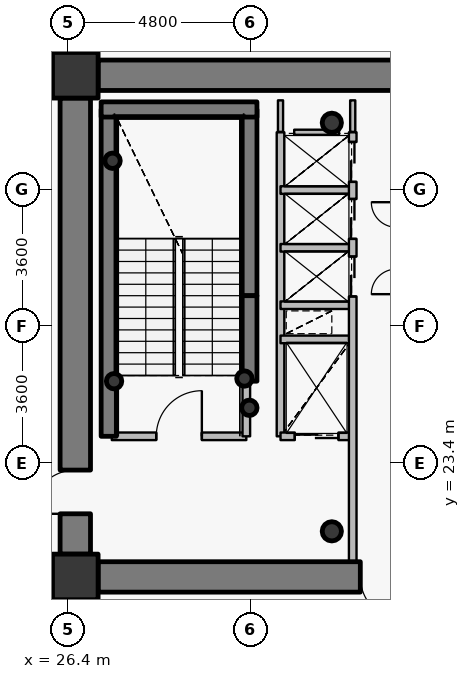
"""IFC4 building model, lengths in metres.
Left out: names, types, materials, properties, quantities, classifications, styles, units other than length and angle.
Written with IfcOpenShell. Run it as: python <this file> out.ifc"""

import sys

from ifc_helpers import new_model, si_unit, direction, frame, frame_2d, origin, origin_2d, place, context, subcontext, project, spatial, rectangle, hollow_circle, extrude, source, transform, mapped, element, fill, save


model = new_model("IFC4")
c1 = context("Model", 3, precision=1e-05, world=origin(), true_north=direction((0.0, 1.0)))
c2 = subcontext(c1, "Body", "Model", "MODEL_VIEW")
j1 = project(units=[si_unit("LENGTHUNIT", "METRE"), si_unit("PLANEANGLEUNIT", "RADIAN")], contexts=[c1])
p1 = place(None, origin())
s1 = spatial("IfcSite", under=j1, at=p1, CompositionType="ELEMENT")
p2 = place(p1, origin())
s2 = spatial("IfcBuilding", under=s1, at=p2, CompositionType="ELEMENT")
p3 = place(p2, frame((0.0, 0.0, 159.9)))
s3 = spatial("IfcBuildingStorey", under=s2, at=p3, CompositionType="ELEMENT", Elevation=159.9)
for number, where, z_axis, x_axis in (
    (1, (26.6, 20.4, 0.0), (0.0, 0.0, 1.0), (1.0, 0.0, 0.0)),
    (2, (26.6, 33.6, 0.0), (0.0, 0.0, 1.0), (1.0, 0.0, 0.0)),
):
    element("IfcColumn", number, at=place(p3, frame(where, z_axis=z_axis, x_axis=x_axis)), inside=s3, PredefinedType="COLUMN", context=c2, shape_type="SweptSolid", body=[
        extrude(rectangle(XDim=1.2, YDim=1.2, at=origin_2d()), origin(), (0.0, 0.0, 1.0), 3.75),
    ])
for number, where, z_axis, x_axis in (
    (3, (33.35, 21.6, 0.0), (0.0, 0.0, 1.0), (1.0, 0.0, 0.0)),
    (4, (33.35, 32.35, 0.0), (0.0, 0.0, 1.0), (1.0, 0.0, 0.0)),
):
    element("IfcColumn", number, at=place(p3, frame(where, z_axis=z_axis, x_axis=x_axis)), inside=s3, PredefinedType="COLUMN", context=c2, shape_type="SweptSolid", body=[
        extrude(hollow_circle(Radius=0.254, WallThickness=0.02, at=origin_2d()), origin(), (0.0, 0.0, 1.0), 3.75),
    ])
p4 = place(p3, frame((27.48, 24.1, 0.0), z_axis=(0.0, 0.0, 1.0), x_axis=(0.0, 1.0, 0.0)))
e5 = element("IfcWall", 5, at=p4, inside=s3, PredefinedType="SHEAR", context=c2, shape_type="SweptSolid", body=[
    extrude(rectangle(XDim=8.6, YDim=0.4, at=frame_2d((4.3, 0.0))), origin(), (0.0, 0.0, 1.0), 3.75),
])
p5 = place(p3, frame((31.18, 27.8, 0.0), z_axis=(0.0, 0.0, 1.0), x_axis=(0.0, 1.0, 0.0)))
e6 = element("IfcWall", 6, at=p5, inside=s3, PredefinedType="SHEAR", context=c2, shape_type="SweptSolid", body=[
    extrude(rectangle(XDim=4.9, YDim=0.4, at=frame_2d((2.45, 0.0))), origin(), (0.0, 0.0, 1.0), 3.75),
])
p6 = place(p3, frame((27.28, 32.7, 0.0), z_axis=(0.0, 0.0, 1.0), x_axis=(1.0, 0.0, 0.0)))
e7 = element("IfcWall", 7, at=p6, inside=s3, PredefinedType="SHEAR", context=c2, shape_type="SweptSolid", body=[
    extrude(rectangle(XDim=4.1, YDim=0.4, at=frame_2d((2.05, 0.0))), origin(), (0.0, 0.0, 1.0), 3.75),
])
for number, where, z_axis, x_axis in (
    (8, (27.58, 31.35, 0.0), (0.0, 0.0, 1.0), (1.0, 0.0, 0.0)),
    (9, (31.05, 25.62, 0.0), (0.0, 0.0, 1.0), (1.0, 0.0, 0.0)),
    (10, (31.18, 24.85, 0.0), (0.0, 0.0, 1.0), (1.0, 0.0, 0.0)),
    (11, (27.62, 25.55, 0.0), (0.0, 0.0, 1.0), (1.0, 0.0, 0.0)),
):
    element("IfcColumn", number, at=place(p3, frame(where, z_axis=z_axis, x_axis=x_axis)), inside=s3, PredefinedType="COLUMN", context=c2, shape_type="SweptSolid", body=[
        extrude(hollow_circle(Radius=0.203, WallThickness=0.016, at=origin_2d()), origin(), (0.0, 0.0, 1.0), 3.75),
    ])
p7 = place(p3, frame((27.2, 33.6, 0.0), z_axis=(0.0, 0.0, 1.0), x_axis=(1.0, 0.0, 0.0)))
e12 = element("IfcWall", 12, at=p7, inside=s3, PredefinedType="SHEAR", context=c2, shape_type="SweptSolid", body=[
    extrude(rectangle(XDim=17.6, YDim=0.8, at=frame_2d((8.8, 0.0))), origin(), (0.0, 0.0, 1.0), 2.95),
])
p8 = place(p7, frame((13.45, 0.0, 0.0)))
e13 = element("IfcOpeningElement", 13, at=p8, cuts=e12, PredefinedType="OPENING", context=c2, shape_type="SweptSolid", body=[
    extrude(rectangle(XDim=1.15, YDim=2.15, at=origin_2d()), frame((0.575, 0.41, 1.075), z_axis=(0.0, -1.0, 0.0), x_axis=(1.0, 0.0, 0.0)), (0.0, 0.0, 1.0), 0.82),
])
p9 = place(p3, frame((44.8, 20.4, 0.0), z_axis=(0.0, 0.0, 1.0), x_axis=(-1.0, 0.0, 0.0)))
e14 = element("IfcWall", 14, at=p9, inside=s3, PredefinedType="SHEAR", context=c2, shape_type="SweptSolid", body=[
    extrude(rectangle(XDim=17.6, YDim=0.8, at=frame_2d((8.8, 0.0))), origin(), (0.0, 0.0, 1.0), 2.95),
])
p10 = place(p9, frame((9.55, 0.0, 0.0)))
e15 = element("IfcOpeningElement", 15, at=p10, cuts=e14, PredefinedType="OPENING", context=c2, shape_type="SweptSolid", body=[
    extrude(rectangle(XDim=1.15, YDim=2.15, at=origin_2d()), frame((0.575, 0.41, 1.075), z_axis=(0.0, -1.0, 0.0), x_axis=(1.0, 0.0, 0.0)), (0.0, 0.0, 1.0), 0.82),
])
p11 = place(p3, frame((26.6, 21.0, 0.0), z_axis=(0.0, 0.0, 1.0), x_axis=(0.0, 1.0, 0.0)))
e16 = element("IfcWall", 16, at=p11, inside=s3, PredefinedType="SHEAR", context=c2, shape_type="SweptSolid", body=[
    extrude(rectangle(XDim=12.0, YDim=0.8, at=frame_2d((6.0, 0.0))), origin(), (0.0, 0.0, 1.0), 2.95),
])
p12 = place(p11, frame((1.061, 0.0, 0.0)))
e17 = element("IfcOpeningElement", 17, at=p12, cuts=e16, PredefinedType="OPENING", context=c2, shape_type="SweptSolid", body=[
    extrude(rectangle(XDim=1.15, YDim=2.15, at=origin_2d()), frame((0.575, 0.41, 1.075), z_axis=(0.0, -1.0, 0.0), x_axis=(1.0, 0.0, 0.0)), (0.0, 0.0, 1.0), 0.82),
])
p13 = place(p3, frame((31.18, 25.55, 0.0), z_axis=(0.0, 0.0, 1.0), x_axis=(0.0, 1.0, 0.0)))
e18 = element("IfcWall", 18, at=p13, inside=s3, PredefinedType="SHEAR", context=c2, shape_type="SweptSolid", body=[
    extrude(rectangle(XDim=2.25, YDim=0.4, at=frame_2d((1.125, 0.0))), origin(), (0.0, 0.0, 1.0), 3.1),
])
p14 = place(p3, frame((27.56, 24.1, 0.0), z_axis=(0.0, 0.0, 1.0), x_axis=(1.0, 0.0, 0.0)))
e19 = element("IfcWall", 19, at=p14, inside=s3, PredefinedType="PARTITIONING", context=c2, shape_type="SweptSolid", body=[
    extrude(rectangle(XDim=3.54, YDim=0.2, at=frame_2d((1.77, 0.0))), origin(), (0.0, 0.0, 1.0), 3.5),
])
p15 = place(p14, frame((1.17, 0.0, 0.0)))
e20 = element("IfcOpeningElement", 20, at=p15, cuts=e19, PredefinedType="OPENING", context=c2, shape_type="SweptSolid", body=[
    extrude(rectangle(XDim=1.2, YDim=2.15, at=origin_2d()), frame((0.6, 0.11, 1.075), z_axis=(0.0, -1.0, 0.0), x_axis=(1.0, 0.0, 0.0)), (0.0, 0.0, 1.0), 0.22),
])
p16 = place(p3, frame((31.1, 24.1, 0.0), z_axis=(0.0, 0.0, 1.0), x_axis=(0.0, 1.0, 0.0)))
e21 = element("IfcWall", 21, at=p16, inside=s3, PredefinedType="PARTITIONING", context=c2, shape_type="SweptSolid", body=[
    extrude(rectangle(XDim=1.44, YDim=0.2, at=frame_2d((0.72, 0.0))), origin(), (0.0, 0.0, 1.0), 3.5),
])
p17 = place(p3, frame((32.0, 24.1, 0.0), z_axis=(0.0, 0.0, 1.0), x_axis=(0.0, 1.0, 0.0)))
e22 = element("IfcWall", 22, at=p17, inside=s3, PredefinedType="PARTITIONING", context=c2, shape_type="SweptSolid", body=[
    extrude(rectangle(XDim=8.0, YDim=0.2, at=frame_2d((4.0, 0.0))), origin(), (0.0, 0.0, 1.0), 3.5),
])
p18 = place(p3, frame((32.0, 24.1, 0.0), z_axis=(0.0, 0.0, 1.0), x_axis=(1.0, 0.0, 0.0)))
e23 = element("IfcWall", 23, at=p18, inside=s3, PredefinedType="PARTITIONING", context=c2, shape_type="SweptSolid", body=[
    extrude(rectangle(XDim=1.9, YDim=0.2, at=frame_2d((0.95, 0.0))), origin(), (0.0, 0.0, 1.0), 3.085),
])
p19 = place(p18, frame((0.375, 0.0, 0.0)))
e24 = element("IfcOpeningElement", 24, at=p19, cuts=e23, PredefinedType="OPENING", context=c2, shape_type="SweptSolid", body=[
    extrude(rectangle(XDim=1.15, YDim=2.15, at=origin_2d()), frame((0.575, 0.11, 1.075), z_axis=(0.0, -1.0, 0.0), x_axis=(1.0, 0.0, 0.0)), (0.0, 0.0, 1.0), 0.22),
])
for number, where, z_axis, x_axis in (
    (25, (32.0, 26.65, 0.0), (0.0, 0.0, 1.0), (1.0, 0.0, 0.0)),
    (26, (32.0, 27.55, 0.0), (0.0, 0.0, 1.0), (1.0, 0.0, 0.0)),
    (27, (32.0, 29.06, 0.0), (0.0, 0.0, 1.0), (1.0, 0.0, 0.0)),
    (28, (32.0, 30.58, 0.0), (0.0, 0.0, 1.0), (1.0, 0.0, 0.0)),
):
    element("IfcWall", number, at=place(p3, frame(where, z_axis=z_axis, x_axis=x_axis)), inside=s3, PredefinedType="PARTITIONING", context=c2, shape_type="SweptSolid", body=[
        extrude(rectangle(XDim=1.9, YDim=0.2, at=frame_2d((0.95, 0.0))), origin(), (0.0, 0.0, 1.0), 3.085),
    ])
p20 = place(p3, frame((33.9, 20.8, 0.0), z_axis=(0.0, 0.0, 1.0), x_axis=(0.0, 1.0, 0.0)))
e29 = element("IfcWall", 29, at=p20, inside=s3, PredefinedType="PARTITIONING", context=c2, shape_type="SweptSolid", body=[
    extrude(rectangle(XDim=11.3, YDim=0.2, at=frame_2d((5.65, 0.0))), origin(), (0.0, 0.0, 1.0), 3.085),
])
p21 = place(p20, frame((6.98, 0.0, 0.0)))
e30 = element("IfcOpeningElement", 30, at=p21, cuts=e29, PredefinedType="OPENING", context=c2, shape_type="SweptSolid", body=[
    extrude(rectangle(XDim=1.05, YDim=2.15, at=origin_2d()), frame((0.525, 0.11, 1.075), z_axis=(0.0, -1.0, 0.0), x_axis=(1.0, 0.0, 0.0)), (0.0, 0.0, 1.0), 0.22),
])
p22 = place(p20, frame((8.495, 0.0, 0.0)))
e31 = element("IfcOpeningElement", 31, at=p22, cuts=e29, PredefinedType="OPENING", context=c2, shape_type="SweptSolid", body=[
    extrude(rectangle(XDim=1.05, YDim=2.15, at=origin_2d()), frame((0.525, 0.11, 1.075), z_axis=(0.0, -1.0, 0.0), x_axis=(1.0, 0.0, 0.0)), (0.0, 0.0, 1.0), 0.22),
])
p23 = place(p20, frame((9.995, 0.0, 0.0)))
e32 = element("IfcOpeningElement", 32, at=p23, cuts=e29, PredefinedType="OPENING", context=c2, shape_type="SweptSolid", body=[
    extrude(rectangle(XDim=1.05, YDim=2.15, at=origin_2d()), frame((0.525, 0.11, 1.075), z_axis=(0.0, -1.0, 0.0), x_axis=(1.0, 0.0, 0.0)), (0.0, 0.0, 1.0), 0.22),
])
p24 = place(p3, frame((32.36, 32.1, 0.0), z_axis=(0.0, 0.0, 1.0), x_axis=(1.0, 0.0, 0.0)))
e33 = element("IfcWall", 33, at=p24, inside=s3, PredefinedType="PARTITIONING", context=c2, shape_type="SweptSolid", body=[
    extrude(rectangle(XDim=1.18, YDim=0.135, at=frame_2d((0.59, 0.0))), origin(), (0.0, 0.0, 1.0), 3.085),
])
p25 = place(p3, frame((32.0, 32.94, 0.0), z_axis=(0.0, 0.0, 1.0), x_axis=(0.0, -1.0, 0.0)))
e34 = element("IfcWall", 34, at=p25, inside=s3, PredefinedType="PARTITIONING", context=c2, shape_type="SweptSolid", body=[
    extrude(rectangle(XDim=0.83, YDim=0.135, at=frame_2d((0.415, 0.0))), origin(), (0.0, 0.0, 1.0), 3.035),
])
p26 = place(p3, frame((33.9, 32.11, 0.0), z_axis=(0.0, 0.0, 1.0), x_axis=(0.0, 1.0, 0.0)))
e35 = element("IfcWall", 35, at=p26, inside=s3, PredefinedType="PARTITIONING", context=c2, shape_type="SweptSolid", body=[
    extrude(rectangle(XDim=0.83, YDim=0.135, at=frame_2d((0.415, 0.0))), origin(), (0.0, 0.0, 1.0), 3.085),
])
p27 = place(p3, frame((27.19, 34.0, 0.0), z_axis=(0.0, 0.0, 1.0), x_axis=(-1.0, 0.0, 0.0)))
e36 = element("IfcWall", 36, at=p27, inside=s3, PredefinedType="PARTITIONING", context=c2, shape_type="SweptSolid", body=[
    extrude(rectangle(XDim=0.99, YDim=0.135, at=frame_2d((0.495, 0.0))), origin(), (0.0, 0.0, 1.0), 2.935),
])
p28 = place(p3, frame((26.2, 33.692, 0.0), z_axis=(0.0, 0.0, 1.0), x_axis=(0.0, -1.0, 0.0)))
e37 = element("IfcWall", 37, at=p28, inside=s3, PredefinedType="PARTITIONING", context=c2, shape_type="SweptSolid", body=[
    extrude(rectangle(XDim=0.682, YDim=0.135, at=frame_2d((0.341, 0.0))), origin(), (0.0, 0.0, 1.0), 3.5),
])
p29 = place(p3, frame((26.2, 20.99, 0.0), z_axis=(0.0, 0.0, 1.0), x_axis=(0.0, -1.0, 0.0)))
e38 = element("IfcWall", 38, at=p29, inside=s3, PredefinedType="PARTITIONING", context=c2, shape_type="SweptSolid", body=[
    extrude(rectangle(XDim=0.99, YDim=0.135, at=frame_2d((0.495, 0.0))), origin(), (0.0, 0.0, 1.0), 3.5),
])
p30 = place(p3, frame((26.508, 20.0, 0.0), z_axis=(0.0, 0.0, 1.0), x_axis=(1.0, 0.0, 0.0)))
e39 = element("IfcWall", 39, at=p30, inside=s3, PredefinedType="PARTITIONING", context=c2, shape_type="SweptSolid", body=[
    extrude(rectangle(XDim=0.682, YDim=0.135, at=frame_2d((0.341, 0.0))), origin(), (0.0, 0.0, 1.0), 2.935),
])
m1 = source(origin(), c2, "Body", "SweptSolid", [
    extrude(rectangle(XDim=1.15, YDim=2.15, at=origin_2d()), frame((0.575, 0.025, 1.075), z_axis=(0.0, -1.0, 0.0), x_axis=(1.0, 0.0, 0.0)), (0.0, 0.0, 1.0), 0.05),
])
p31 = place(p12, origin())
e40 = element("IfcDoor", 40, at=p31, inside=s3, OperationType="SINGLE_SWING_LEFT", PredefinedType="DOOR", context=c2, shape_type="MappedRepresentation", body=[
    mapped(m1, transform((0.0, 0.0, 0.0), x_axis=(1.0, 0.0, 0.0), y_axis=(0.0, 1.0, 0.0), z_axis=(0.0, 0.0, 1.0), scale=1.0)),
])
fill(e17, e40)
p32 = place(p10, origin())
e41 = element("IfcDoor", 41, at=p32, inside=s3, OperationType="SINGLE_SWING_LEFT", PredefinedType="DOOR", context=c2, shape_type="MappedRepresentation", body=[
    mapped(m1, transform((0.0, 0.0, 0.0), x_axis=(1.0, 0.0, 0.0), y_axis=(0.0, 1.0, 0.0), z_axis=(0.0, 0.0, 1.0), scale=1.0)),
])
fill(e15, e41)
m2 = source(origin(), c2, "Body", "SweptSolid", [
    extrude(rectangle(XDim=1.2, YDim=2.15, at=origin_2d()), frame((0.6, 0.025, 1.075), z_axis=(0.0, -1.0, 0.0), x_axis=(1.0, 0.0, 0.0)), (0.0, 0.0, 1.0), 0.05),
])
p33 = place(p15, origin())
e42 = element("IfcDoor", 42, at=p33, inside=s3, OperationType="SINGLE_SWING_RIGHT", PredefinedType="DOOR", context=c2, shape_type="MappedRepresentation", body=[
    mapped(m2, transform((0.0, 0.0, 0.0), x_axis=(1.0, 0.0, 0.0), y_axis=(0.0, 1.0, 0.0), z_axis=(0.0, 0.0, 1.0), scale=1.0)),
])
fill(e20, e42)
m3 = source(origin(), c2, "Body", "SweptSolid", [
    extrude(rectangle(XDim=1.15, YDim=2.15, at=origin_2d()), frame((0.575, 0.025, 1.075), z_axis=(0.0, -1.0, 0.0), x_axis=(1.0, 0.0, 0.0)), (0.0, 0.0, 1.0), 0.05),
])
p34 = place(p19, origin())
e43 = element("IfcDoor", 43, at=p34, inside=s3, OperationType="DOUBLE_DOOR_SLIDING", PredefinedType="USERDEFINED", context=c2, shape_type="MappedRepresentation", body=[
    mapped(m3, transform((0.0, 0.0, 0.0), x_axis=(1.0, 0.0, 0.0), y_axis=(0.0, 1.0, 0.0), z_axis=(0.0, 0.0, 1.0), scale=1.0)),
])
fill(e24, e43)
m4 = source(origin(), c2, "Body", "SweptSolid", [
    extrude(rectangle(XDim=1.05, YDim=2.15, at=origin_2d()), frame((0.525, 0.025, 1.075), z_axis=(0.0, -1.0, 0.0), x_axis=(1.0, 0.0, 0.0)), (0.0, 0.0, 1.0), 0.05),
])
p35 = place(p21, origin())
e44 = element("IfcDoor", 44, at=p35, inside=s3, OperationType="DOUBLE_DOOR_SLIDING", PredefinedType="USERDEFINED", context=c2, shape_type="MappedRepresentation", body=[
    mapped(m4, transform((0.0, 0.0, 0.0), x_axis=(1.0, 0.0, 0.0), y_axis=(0.0, 1.0, 0.0), z_axis=(0.0, 0.0, 1.0), scale=1.0)),
])
fill(e30, e44)
p36 = place(p22, origin())
e45 = element("IfcDoor", 45, at=p36, inside=s3, OperationType="DOUBLE_DOOR_SLIDING", PredefinedType="USERDEFINED", context=c2, shape_type="MappedRepresentation", body=[
    mapped(m4, transform((0.0, 0.0, 0.0), x_axis=(1.0, 0.0, 0.0), y_axis=(0.0, 1.0, 0.0), z_axis=(0.0, 0.0, 1.0), scale=1.0)),
])
fill(e31, e45)
p37 = place(p23, origin())
e46 = element("IfcDoor", 46, at=p37, inside=s3, OperationType="DOUBLE_DOOR_SLIDING", PredefinedType="USERDEFINED", context=c2, shape_type="MappedRepresentation", body=[
    mapped(m4, transform((0.0, 0.0, 0.0), x_axis=(1.0, 0.0, 0.0), y_axis=(0.0, 1.0, 0.0), z_axis=(0.0, 0.0, 1.0), scale=1.0)),
])
fill(e32, e46)
save(model, sys.argv[1])
